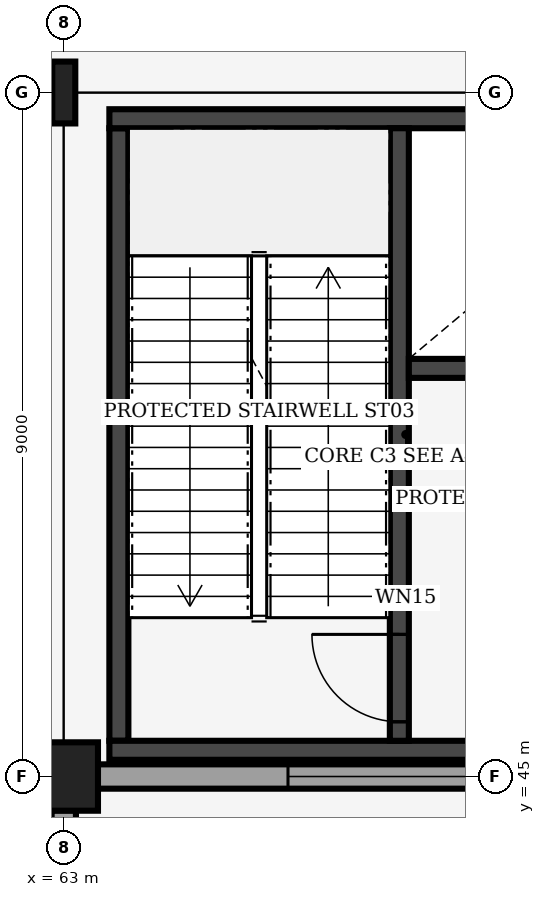
"""IFC4 building model, lengths in metres.
Left out: names, types, materials, properties, quantities, classifications, styles, units other than length and angle.
Written with IfcOpenShell. Run it as: python <this file> out.ifc"""

import sys

from ifc_helpers import new_model, si_unit, direction, frame, frame_2d, origin, origin_2d, place, context, subcontext, project, spatial, rectangle, i_section, extrude, element, fill, save


model = new_model("IFC4")
c1 = context("Model", 3, precision=1e-05, world=origin(), true_north=direction((0.0, 1.0)))
c2 = subcontext(c1, "Body", "Model", "MODEL_VIEW")
j1 = project(units=[si_unit("LENGTHUNIT", "METRE"), si_unit("PLANEANGLEUNIT", "RADIAN")], contexts=[c1])
p1 = place(None, origin())
s1 = spatial("IfcSite", under=j1, at=p1, CompositionType="ELEMENT")
p2 = place(p1, origin())
s2 = spatial("IfcBuilding", under=s1, at=p2, CompositionType="ELEMENT")
p3 = place(p2, origin())
s3 = spatial("IfcBuildingStorey", under=s2, at=p3, CompositionType="ELEMENT", Elevation=0.0)
p4 = place(p3, frame((63.0, 45.0, 0.0), z_axis=(0.0, 0.0, 1.0), x_axis=(1.0, 0.0, 0.0)))
e1 = element("IfcColumn", 1, at=p4, inside=s3, PredefinedType="COLUMN", context=c2, shape_type="SweptSolid", body=[
    extrude(rectangle(XDim=0.9, YDim=0.9, at=origin_2d()), origin(), (0.0, 0.0, 1.0), 6.0),
])
p5 = place(p3, frame((63.0, 54.0, 0.0), z_axis=(0.0, 0.0, 1.0), x_axis=(1.0, 0.0, 0.0)))
e2 = element("IfcColumn", 2, at=p5, inside=s3, PredefinedType="COLUMN", context=c2, shape_type="SweptSolid", body=[
    extrude(i_section(OverallWidth=0.303, OverallDepth=0.814, WebThickness=0.021, FlangeThickness=0.04, FilletRadius=0.03, at=origin_2d()), origin(), (0.0, 0.0, 1.0), 6.0),
])
p6 = place(p3, frame((63.0, 36.402, 0.0), z_axis=(0.0, 0.0, 1.0), x_axis=(0.0, 1.0, 0.0)))
e3 = element("IfcWall", 3, at=p6, inside=s3, PredefinedType="SOLIDWALL", context=c2, shape_type="SweptSolid", body=[
    extrude(rectangle(XDim=8.153, YDim=0.32, at=frame_2d((4.076, 0.0))), origin(), (0.0, 0.0, 1.0), 4.95),
])
p7 = place(p3, frame((63.445, 45.0, 0.0), z_axis=(0.0, 0.0, 1.0), x_axis=(1.0, 0.0, 0.0)))
e4 = element("IfcWall", 4, at=p7, inside=s3, PredefinedType="SOLIDWALL", context=c2, shape_type="SweptSolid", body=[
    extrude(rectangle(XDim=8.408, YDim=0.32, at=frame_2d((4.204, 0.0))), origin(), (0.0, 0.0, 1.0), 4.95),
])
p8 = place(p7, frame((2.505, 0.0, 3.3)))
e5 = element("IfcOpeningElement", 5, at=p8, cuts=e4, PredefinedType="OPENING", context=c2, shape_type="SweptSolid", body=[
    extrude(rectangle(XDim=3.1, YDim=1.3, at=frame_2d((1.55, 0.65))), frame((0.0, 0.17, 0.0), z_axis=(0.0, -1.0, 0.0), x_axis=(1.0, 0.0, 0.0)), (0.0, 0.0, 1.0), 0.34),
])
p9 = place(p3, frame((63.725, 45.47, 0.0), z_axis=(0.0, 0.0, 1.0), x_axis=(0.0, 1.0, 0.0)))
e6 = element("IfcWall", 6, at=p9, inside=s3, PredefinedType="SHEAR", context=c2, shape_type="SweptSolid", body=[
    extrude(rectangle(XDim=8.06, YDim=0.25, at=frame_2d((4.03, 0.0))), origin(), (0.0, 0.0, 1.0), 5.71),
])
for number, where, z_axis, x_axis in (
    (7, (63.6, 45.345, 0.0), (0.0, 0.0, 1.0), (1.0, 0.0, 0.0)),
    (8, (63.6, 53.655, 0.0), (0.0, 0.0, 1.0), (1.0, 0.0, 0.0)),
):
    element("IfcWall", number, at=place(p3, frame(where, z_axis=z_axis, x_axis=x_axis)), inside=s3, PredefinedType="SHEAR", context=c2, shape_type="SweptSolid", body=[
        extrude(rectangle(XDim=7.8, YDim=0.25, at=frame_2d((3.9, 0.0))), origin(), (0.0, 0.0, 1.0), 5.71),
    ])
p10 = place(p3, frame((67.415, 45.47, 0.0), z_axis=(0.0, 0.0, 1.0), x_axis=(0.0, 1.0, 0.0)))
e9 = element("IfcWall", 9, at=p10, inside=s3, PredefinedType="SHEAR", context=c2, shape_type="SweptSolid", body=[
    extrude(rectangle(XDim=8.06, YDim=0.25, at=frame_2d((4.03, 0.0))), origin(), (0.0, 0.0, 1.0), 5.71),
])
p11 = place(p10, frame((0.25, 0.0, 0.0)))
e10 = element("IfcOpeningElement", 10, at=p11, cuts=e9, PredefinedType="OPENING", context=c2, shape_type="SweptSolid", body=[
    extrude(rectangle(XDim=1.15, YDim=2.15, at=frame_2d((0.575, 1.075))), frame((0.0, 0.135, 0.0), z_axis=(0.0, -1.0, 0.0), x_axis=(1.0, 0.0, 0.0)), (0.0, 0.0, 1.0), 0.27),
])
p12 = place(p3, frame((67.54, 50.37, 0.0), z_axis=(0.0, 0.0, 1.0), x_axis=(1.0, 0.0, 0.0)))
e11 = element("IfcWall", 11, at=p12, inside=s3, PredefinedType="SHEAR", context=c2, shape_type="SweptSolid", body=[
    extrude(rectangle(XDim=3.61, YDim=0.25, at=frame_2d((1.805, 0.0))), origin(), (0.0, 0.0, 1.0), 5.71),
])
p13 = place(p12, frame((0.95, 0.0, 0.0)))
e12 = element("IfcOpeningElement", 12, at=p13, cuts=e11, PredefinedType="OPENING", context=c2, shape_type="SweptSolid", body=[
    extrude(rectangle(XDim=1.2, YDim=2.2, at=frame_2d((0.6, 1.1))), frame((0.0, 0.135, 0.0), z_axis=(0.0, -1.0, 0.0), x_axis=(1.0, 0.0, 0.0)), (0.0, 0.0, 1.0), 0.27),
])
p14 = place(p8, origin())
e13 = element("IfcWindow", 13, at=p14, inside=s3, PartitioningType="SINGLE_PANEL", PredefinedType="WINDOW", context=c2, shape_type="SweptSolid", body=[
    extrude(rectangle(XDim=3.1, YDim=1.3, at=frame_2d((1.55, 0.65))), frame((0.0, 0.03, 0.0), z_axis=(0.0, -1.0, 0.0), x_axis=(1.0, 0.0, 0.0)), (0.0, 0.0, 1.0), 0.06),
])
fill(e5, e13)
p15 = place(p11, origin())
e14 = element("IfcDoor", 14, at=p15, inside=s3, OperationType="SINGLE_SWING_RIGHT", PredefinedType="DOOR", context=c2, shape_type="SweptSolid", body=[
    extrude(rectangle(XDim=1.15, YDim=2.15, at=frame_2d((0.575, 1.075))), frame((0.0, 0.025, 0.0), z_axis=(0.0, -1.0, 0.0), x_axis=(1.0, 0.0, 0.0)), (0.0, 0.0, 1.0), 0.05),
])
fill(e10, e14)
save(model, sys.argv[1])
